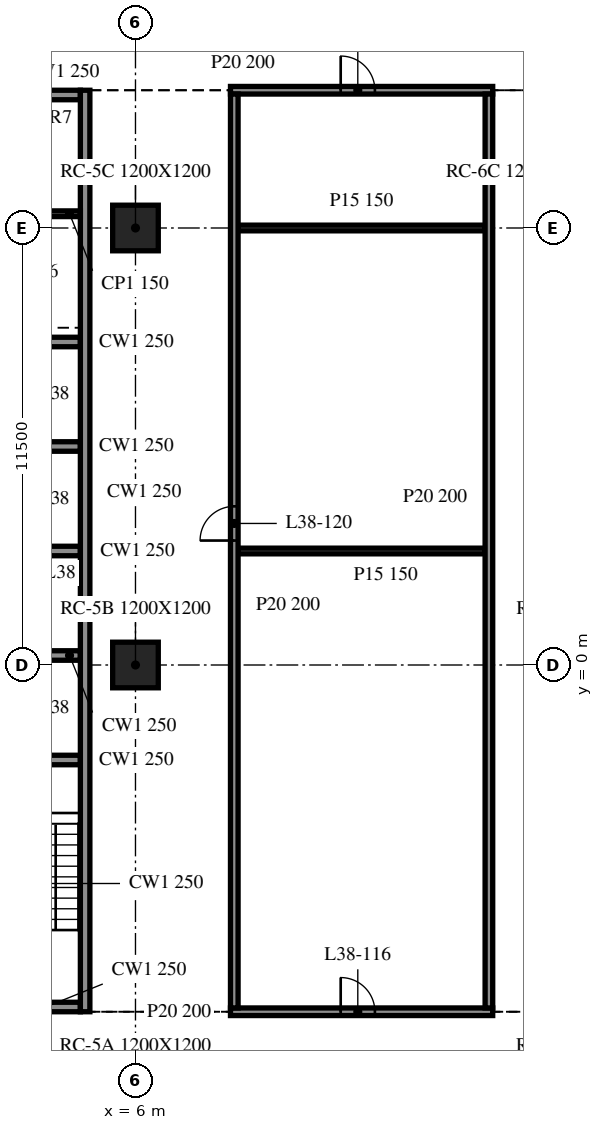
"""IFC4 building model, lengths in metres.
Left out: names, types, materials, properties, quantities, classifications, styles, units other than length and angle.
Written with IfcOpenShell. Run it as: python <this file> out.ifc"""

import sys

from ifc_helpers import new_model, si_unit, direction, frame, frame_2d, origin, origin_2d, place, context, subcontext, project, spatial, rectangle, extrude, element, fill, save


model = new_model("IFC4")
c1 = context("Model", 3, precision=1e-05, world=origin(), true_north=direction((0.0, 1.0)))
c2 = subcontext(c1, "Body", "Model", "MODEL_VIEW")
j1 = project(units=[si_unit("LENGTHUNIT", "METRE"), si_unit("PLANEANGLEUNIT", "RADIAN")], contexts=[c1])
p1 = place(None, origin())
s1 = spatial("IfcSite", under=j1, at=p1, CompositionType="ELEMENT")
p2 = place(p1, origin())
s2 = spatial("IfcBuilding", under=s1, at=p2, CompositionType="ELEMENT")
p3 = place(p2, frame((0.0, 0.0, 163.0)))
s3 = spatial("IfcBuildingStorey", under=s2, at=p3, CompositionType="ELEMENT", Elevation=163.0)
for number, where, z_axis, x_axis in (
    (1, (6.0, 0.0, -0.34), (0.0, 0.0, 1.0), (1.0, 0.0, 0.0)),
    (2, (6.0, 11.5, -0.34), (0.0, 0.0, 1.0), (1.0, 0.0, 0.0)),
):
    element("IfcColumn", number, at=place(p3, frame(where, z_axis=z_axis, x_axis=x_axis)), inside=s3, PredefinedType="COLUMN", context=c2, shape_type="SweptSolid", body=[
        extrude(rectangle(XDim=1.2, YDim=1.2, at=origin_2d()), origin(), (0.0, 0.0, 1.0), 3.8),
    ])
p4 = place(p3, frame((4.675, -9.125, 0.0), z_axis=(0.0, 0.0, 1.0), x_axis=(0.0, 1.0, 0.0)))
e3 = element("IfcWall", 3, at=p4, inside=s3, PredefinedType="SOLIDWALL", context=c2, shape_type="SweptSolid", body=[
    extrude(rectangle(XDim=24.25, YDim=0.25, at=frame_2d((12.125, 0.0))), origin(), (0.0, 0.0, 1.0), 3.46),
])
p5 = place(p3, frame((4.55, -9.0, 0.0), z_axis=(0.0, 0.0, 1.0), x_axis=(-1.0, 0.0, 0.0)))
e4 = element("IfcWall", 4, at=p5, inside=s3, PredefinedType="SOLIDWALL", context=c2, shape_type="SweptSolid", body=[
    extrude(rectangle(XDim=9.1, YDim=0.25, at=frame_2d((4.55, 0.0))), origin(), (0.0, 0.0, 1.0), 3.46),
])
p6 = place(p5, frame((3.65, 0.0, 0.0)))
e5 = element("IfcOpeningElement", 5, at=p6, cuts=e4, PredefinedType="OPENING", context=c2, shape_type="SweptSolid", body=[
    extrude(rectangle(XDim=1.8, YDim=2.1, at=frame_2d((0.9, 1.05))), frame((0.0, 0.135, 0.0), z_axis=(0.0, -1.0, 0.0), x_axis=(1.0, 0.0, 0.0)), (0.0, 0.0, 1.0), 0.27),
])
p7 = place(p3, frame((-4.55, 15.0, 0.0), z_axis=(0.0, 0.0, 1.0), x_axis=(1.0, 0.0, 0.0)))
e6 = element("IfcWall", 6, at=p7, inside=s3, PredefinedType="SOLIDWALL", context=c2, shape_type="SweptSolid", body=[
    extrude(rectangle(XDim=9.1, YDim=0.25, at=frame_2d((4.55, 0.0))), origin(), (0.0, 0.0, 1.0), 3.46),
])
p8 = place(p7, frame((3.65, 0.0, 0.0)))
e7 = element("IfcOpeningElement", 7, at=p8, cuts=e6, PredefinedType="OPENING", context=c2, shape_type="SweptSolid", body=[
    extrude(rectangle(XDim=1.8, YDim=2.1, at=frame_2d((0.9, 1.05))), frame((0.0, 0.135, 0.0), z_axis=(0.0, -1.0, 0.0), x_axis=(1.0, 0.0, 0.0)), (0.0, 0.0, 1.0), 0.27),
])
for number, where, z_axis, x_axis in (
    (8, (1.7, -2.5, 0.0), (0.0, 0.0, 1.0), (1.0, 0.0, 0.0)),
    (9, (1.7, 0.25, 0.0), (0.0, 0.0, 1.0), (1.0, 0.0, 0.0)),
    (10, (1.7, 3.0, 0.0), (0.0, 0.0, 1.0), (1.0, 0.0, 0.0)),
    (11, (1.7, 5.75, 0.0), (0.0, 0.0, 1.0), (1.0, 0.0, 0.0)),
    (12, (1.7, 8.5, 0.0), (0.0, 0.0, 1.0), (1.0, 0.0, 0.0)),
):
    element("IfcWall", number, at=place(p3, frame(where, z_axis=z_axis, x_axis=x_axis)), inside=s3, PredefinedType="SOLIDWALL", context=c2, shape_type="SweptSolid", body=[
        extrude(rectangle(XDim=2.85, YDim=0.25, at=frame_2d((1.425, 0.0))), origin(), (0.0, 0.0, 1.0), 3.46),
    ])
p9 = place(p3, frame((1.7, 11.875, 0.0), z_axis=(0.0, 0.0, 1.0), x_axis=(1.0, 0.0, 0.0)))
e13 = element("IfcWall", 13, at=p9, inside=s3, PredefinedType="PARTITIONING", context=c2, shape_type="SweptSolid", body=[
    extrude(rectangle(XDim=2.85, YDim=0.15, at=frame_2d((1.425, 0.0))), origin(), (0.0, 0.0, 1.0), 3.46),
])
p10 = place(p3, frame((8.5, -9.125, 0.0), z_axis=(0.0, 0.0, 1.0), x_axis=(1.0, 0.0, 0.0)))
e14 = element("IfcWall", 14, at=p10, inside=s3, PredefinedType="PARTITIONING", context=c2, shape_type="SweptSolid", body=[
    extrude(rectangle(XDim=6.9, YDim=0.2, at=frame_2d((3.45, 0.0))), origin(), (0.0, 0.0, 1.0), 3.46),
])
p11 = place(p10, frame((2.9, 0.0, 0.0)))
e15 = element("IfcOpeningElement", 15, at=p11, cuts=e14, PredefinedType="OPENING", context=c2, shape_type="SweptSolid", body=[
    extrude(rectangle(XDim=0.9, YDim=2.1, at=frame_2d((0.45, 1.05))), frame((0.0, 0.11, 0.0), z_axis=(0.0, -1.0, 0.0), x_axis=(1.0, 0.0, 0.0)), (0.0, 0.0, 1.0), 0.22),
])
for number, where, z_axis, x_axis in (
    (16, (8.7, 3.0, 0.0), (0.0, 0.0, 1.0), (1.0, 0.0, 0.0)),
    (17, (8.7, 11.5, 0.0), (0.0, 0.0, 1.0), (1.0, 0.0, 0.0)),
):
    element("IfcWall", number, at=place(p3, frame(where, z_axis=z_axis, x_axis=x_axis)), inside=s3, PredefinedType="PARTITIONING", context=c2, shape_type="SweptSolid", body=[
        extrude(rectangle(XDim=6.5, YDim=0.15, at=frame_2d((3.25, 0.0))), origin(), (0.0, 0.0, 1.0), 3.46),
    ])
p12 = place(p3, frame((8.5, 15.125, 0.0), z_axis=(0.0, 0.0, 1.0), x_axis=(1.0, 0.0, 0.0)))
e18 = element("IfcWall", 18, at=p12, inside=s3, PredefinedType="PARTITIONING", context=c2, shape_type="SweptSolid", body=[
    extrude(rectangle(XDim=6.9, YDim=0.2, at=frame_2d((3.45, 0.0))), origin(), (0.0, 0.0, 1.0), 3.46),
])
p13 = place(p12, frame((2.9, 0.0, 0.0)))
e19 = element("IfcOpeningElement", 19, at=p13, cuts=e18, PredefinedType="OPENING", context=c2, shape_type="SweptSolid", body=[
    extrude(rectangle(XDim=0.9, YDim=2.1, at=frame_2d((0.45, 1.05))), frame((0.0, 0.11, 0.0), z_axis=(0.0, -1.0, 0.0), x_axis=(1.0, 0.0, 0.0)), (0.0, 0.0, 1.0), 0.22),
])
p14 = place(p3, frame((8.6, -9.025, 0.0), z_axis=(0.0, 0.0, 1.0), x_axis=(0.0, 1.0, 0.0)))
e20 = element("IfcWall", 20, at=p14, inside=s3, PredefinedType="PARTITIONING", context=c2, shape_type="SweptSolid", body=[
    extrude(rectangle(XDim=24.05, YDim=0.2, at=frame_2d((12.025, 0.0))), origin(), (0.0, 0.0, 1.0), 3.46),
])
p15 = place(p14, frame((12.3, 0.0, 0.0)))
e21 = element("IfcOpeningElement", 21, at=p15, cuts=e20, PredefinedType="OPENING", context=c2, shape_type="SweptSolid", body=[
    extrude(rectangle(XDim=0.9, YDim=2.1, at=frame_2d((0.45, 1.05))), frame((0.0, 0.11, 0.0), z_axis=(0.0, -1.0, 0.0), x_axis=(1.0, 0.0, 0.0)), (0.0, 0.0, 1.0), 0.22),
])
p16 = place(p3, frame((15.3, -9.025, 0.0), z_axis=(0.0, 0.0, 1.0), x_axis=(0.0, 1.0, 0.0)))
e22 = element("IfcWall", 22, at=p16, inside=s3, PredefinedType="PARTITIONING", context=c2, shape_type="SweptSolid", body=[
    extrude(rectangle(XDim=24.05, YDim=0.2, at=frame_2d((12.025, 0.0))), origin(), (0.0, 0.0, 1.0), 3.46),
])
p17 = place(p11, origin())
e23 = element("IfcDoor", 23, at=p17, inside=s3, OperationType="SINGLE_SWING_LEFT", PredefinedType="DOOR", context=c2, shape_type="SweptSolid", body=[
    extrude(rectangle(XDim=0.9, YDim=2.1, at=frame_2d((0.45, 1.05))), frame((0.0, 0.025, 0.0), z_axis=(0.0, -1.0, 0.0), x_axis=(1.0, 0.0, 0.0)), (0.0, 0.0, 1.0), 0.05),
])
fill(e15, e23)
p18 = place(p15, origin())
e24 = element("IfcDoor", 24, at=p18, inside=s3, OperationType="SINGLE_SWING_LEFT", PredefinedType="DOOR", context=c2, shape_type="SweptSolid", body=[
    extrude(rectangle(XDim=0.9, YDim=2.1, at=frame_2d((0.45, 1.05))), frame((0.0, 0.025, 0.0), z_axis=(0.0, -1.0, 0.0), x_axis=(1.0, 0.0, 0.0)), (0.0, 0.0, 1.0), 0.05),
])
fill(e21, e24)
p19 = place(p13, origin())
e25 = element("IfcDoor", 25, at=p19, inside=s3, OperationType="SINGLE_SWING_RIGHT", PredefinedType="DOOR", context=c2, shape_type="SweptSolid", body=[
    extrude(rectangle(XDim=0.9, YDim=2.1, at=frame_2d((0.45, 1.05))), frame((0.0, 0.025, 0.0), z_axis=(0.0, -1.0, 0.0), x_axis=(1.0, 0.0, 0.0)), (0.0, 0.0, 1.0), 0.05),
])
fill(e19, e25)
save(model, sys.argv[1])
